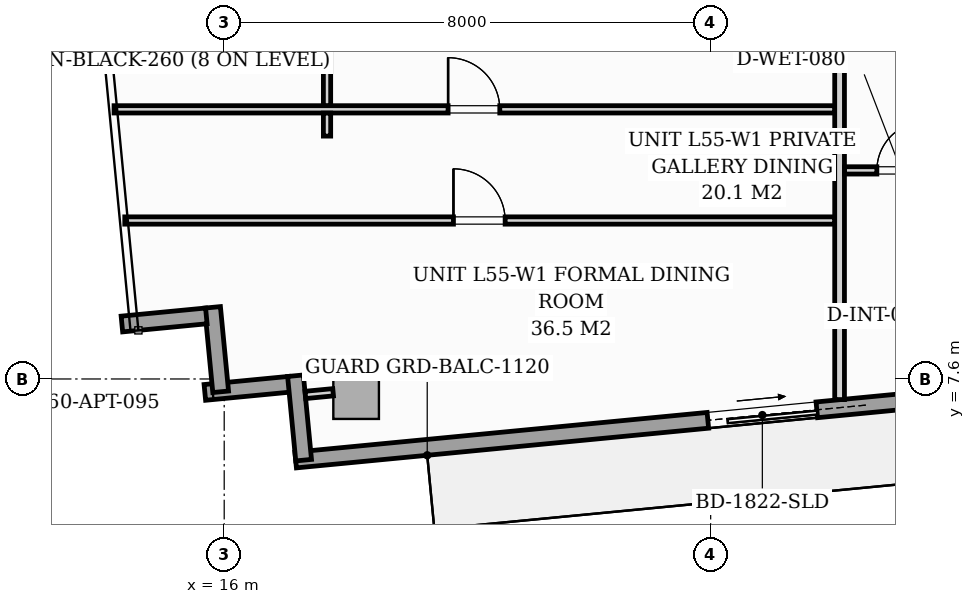
"""IFC4 building model, lengths in metres.
Left out: names, types, materials, properties, quantities, classifications, styles, units other than length and angle.
Written with IfcOpenShell. Run it as: python <this file> out.ifc"""

import sys

from ifc_helpers import new_model, si_unit, direction, frame, frame_2d, origin, origin_2d, place, context, subcontext, project, spatial, rectangle, extrude, source, transform, mapped, element, fill, save


model = new_model("IFC4")
c1 = context("Model", 3, precision=1e-05, world=origin(), true_north=direction((0.0, 1.0)))
c2 = subcontext(c1, "Body", "Model", "MODEL_VIEW")
j1 = project(units=[si_unit("LENGTHUNIT", "METRE"), si_unit("PLANEANGLEUNIT", "RADIAN")], contexts=[c1])
p1 = place(None, origin())
s1 = spatial("IfcSite", under=j1, at=p1, CompositionType="ELEMENT")
p2 = place(p1, origin())
s2 = spatial("IfcBuilding", under=s1, at=p2, CompositionType="ELEMENT")
p3 = place(p2, frame((0.0, 0.0, 192.2)))
s3 = spatial("IfcBuildingStorey", under=s2, at=p3, CompositionType="ELEMENT", Elevation=192.2)
m1 = source(origin(), c2, "Body", "SweptSolid", [
    extrude(rectangle(XDim=0.75, YDim=0.95, at=origin_2d()), origin(), (0.0, 0.0, 1.0), 3.196),
])
p4 = place(p3, frame((18.169, 7.418, 0.002), z_axis=(0.0, 0.0, 1.0), x_axis=(0.995396198367, 0.09584575252, 0.0)))
e1 = element("IfcColumn", 1, at=p4, inside=s3, PredefinedType="COLUMN", context=c2, shape_type="MappedRepresentation", body=[
    mapped(m1, transform((0.0, 0.0, 0.0), scale=1.0)),
])
p5 = place(p3, frame((17.07, 7.513, 0.0), z_axis=(0.0, 0.0, 1.0), x_axis=(-0.995391056452, -0.09589913835, 0.0)))
e2 = element("IfcWall", 2, at=p5, inside=s3, PredefinedType="STANDARD", context=c2, shape_type="SweptSolid", body=[
    extrude(rectangle(XDim=1.395, YDim=0.26, at=frame_2d((0.698, 0.0))), origin(), (0.0, 0.0, 1.0), 2.94),
])
p6 = place(p3, frame((15.942, 7.389, 0.0), z_axis=(0.0, 0.0, 1.0), x_axis=(-0.095742423056, 0.99540614245, 0.0)))
e3 = element("IfcWall", 3, at=p6, inside=s3, PredefinedType="STANDARD", context=c2, shape_type="SweptSolid", body=[
    extrude(rectangle(XDim=1.395, YDim=0.26, at=frame_2d((0.697, 0.0))), origin(), (0.0, 0.0, 1.0), 2.94),
])
p7 = place(p3, frame((15.706, 8.637, 0.0), z_axis=(0.0, 0.0, 1.0), x_axis=(-0.995391056452, -0.09589913835, 0.0)))
e4 = element("IfcWall", 4, at=p7, inside=s3, PredefinedType="STANDARD", context=c2, shape_type="SweptSolid", body=[
    extrude(rectangle(XDim=1.395, YDim=0.26, at=frame_2d((0.698, 0.0))), origin(), (0.0, 0.0, 1.0), 2.94),
])
p8 = place(p3, frame((33.201, 7.81, 0.0), z_axis=(0.0, 0.0, 1.0), x_axis=(-0.995397074604, -0.095836652014, 0.0)))
e5 = element("IfcWall", 5, at=p8, inside=s3, PredefinedType="STANDARD", context=c2, shape_type="SweptSolid", body=[
    extrude(rectangle(XDim=16.1, YDim=0.26, at=frame_2d((8.05, 0.0))), origin(), (0.0, 0.0, 1.0), 2.94),
])
p9 = place(p8, frame((7.49, 0.0, 0.0)))
e6 = element("IfcOpeningElement", 6, at=p9, cuts=e5, PredefinedType="OPENING", context=c2, shape_type="SweptSolid", body=[
    extrude(rectangle(XDim=1.8, YDim=2.06, at=frame_2d((0.9, 1.03))), frame((0.0, 0.14, 0.0), z_axis=(0.0, -1.0, 0.0), x_axis=(1.0, 0.0, 0.0)), (0.0, 0.0, 1.0), 0.28),
])
p10 = place(p8, frame((1.15, 0.0, 0.65)))
e7 = element("IfcOpeningElement", 7, at=p10, cuts=e5, PredefinedType="OPENING", context=c2, shape_type="SweptSolid", body=[
    extrude(rectangle(XDim=1.6, YDim=1.5, at=frame_2d((0.8, 0.75))), frame((0.0, 0.14, 0.0), z_axis=(0.0, -1.0, 0.0), x_axis=(1.0, 0.0, 0.0)), (0.0, 0.0, 1.0), 0.28),
])
p11 = place(p3, frame((17.306, 6.265, 0.0), z_axis=(0.0, 0.0, 1.0), x_axis=(-0.095915846097, 0.995389446633, 0.0)))
e8 = element("IfcWall", 8, at=p11, inside=s3, PredefinedType="STANDARD", context=c2, shape_type="SweptSolid", body=[
    extrude(rectangle(XDim=1.395, YDim=0.26, at=frame_2d((0.697, 0.0))), origin(), (0.0, 0.0, 1.0), 2.94),
])
p12 = place(p3, frame((26.12, 7.261, 0.0), z_axis=(0.0, 0.0, 1.0), x_axis=(0.0, 1.0, 0.0)))
e9 = element("IfcWall", 9, at=p12, inside=s3, PredefinedType="PARTITIONING", context=c2, shape_type="SweptSolid", body=[
    extrude(rectangle(XDim=5.937, YDim=0.16, at=frame_2d((2.968, 0.0))), origin(), (0.0, 0.0, 1.0), 2.94),
])
p13 = place(p3, frame((26.202, 11.03, 0.0), z_axis=(0.0, 0.0, 1.0), x_axis=(1.0, 0.0, 0.0)))
e10 = element("IfcWall", 10, at=p13, inside=s3, PredefinedType="PARTITIONING", context=c2, shape_type="SweptSolid", body=[
    extrude(rectangle(XDim=3.978, YDim=0.12, at=frame_2d((1.989, 0.0))), origin(), (0.0, 0.0, 1.0), 2.94),
])
p14 = place(p13, frame((0.531, 0.0, 0.0)))
e11 = element("IfcOpeningElement", 11, at=p14, cuts=e10, PredefinedType="OPENING", context=c2, shape_type="SweptSolid", body=[
    extrude(rectangle(XDim=0.8, YDim=2.02, at=frame_2d((0.4, 1.01))), frame((0.0, 0.07, 0.0), z_axis=(0.0, -1.0, 0.0), x_axis=(1.0, 0.0, 0.0)), (0.0, 0.0, 1.0), 0.14),
])
p15 = place(p13, frame((2.496, 0.0, 0.0)))
e12 = element("IfcOpeningElement", 12, at=p15, cuts=e10, PredefinedType="OPENING", context=c2, shape_type="SweptSolid", body=[
    extrude(rectangle(XDim=0.85, YDim=2.05, at=frame_2d((0.425, 1.025))), frame((0.0, 0.07, 0.0), z_axis=(0.0, -1.0, 0.0), x_axis=(1.0, 0.0, 0.0)), (0.0, 0.0, 1.0), 0.14),
])
p16 = place(p3, frame((14.365, 10.206, 0.0), z_axis=(0.0, 0.0, 1.0), x_axis=(1.0, 0.0, 0.0)))
e13 = element("IfcWall", 13, at=p16, inside=s3, PredefinedType="PARTITIONING", context=c2, shape_type="SweptSolid", body=[
    extrude(rectangle(XDim=11.673, YDim=0.12, at=frame_2d((5.837, 0.0))), origin(), (0.0, 0.0, 1.0), 2.94),
])
p17 = place(p16, frame((5.405, 0.0, 0.0)))
e14 = element("IfcOpeningElement", 14, at=p17, cuts=e13, PredefinedType="OPENING", context=c2, shape_type="SweptSolid", body=[
    extrude(rectangle(XDim=0.85, YDim=2.05, at=frame_2d((0.425, 1.025))), frame((0.0, 0.07, 0.0), z_axis=(0.0, -1.0, 0.0), x_axis=(1.0, 0.0, 0.0)), (0.0, 0.0, 1.0), 0.14),
])
p18 = place(p3, frame((14.189, 12.034, 0.0), z_axis=(0.0, 0.0, 1.0), x_axis=(1.0, 0.0, 0.0)))
e15 = element("IfcWall", 15, at=p18, inside=s3, PredefinedType="PARTITIONING", context=c2, shape_type="SweptSolid", body=[
    extrude(rectangle(XDim=11.849, YDim=0.12, at=frame_2d((5.925, 0.0))), origin(), (0.0, 0.0, 1.0), 2.94),
])
p19 = place(p18, frame((5.493, 0.0, 0.0)))
e16 = element("IfcOpeningElement", 16, at=p19, cuts=e15, PredefinedType="OPENING", context=c2, shape_type="SweptSolid", body=[
    extrude(rectangle(XDim=0.85, YDim=2.05, at=frame_2d((0.425, 1.025))), frame((0.0, 0.07, 0.0), z_axis=(0.0, -1.0, 0.0), x_axis=(1.0, 0.0, 0.0)), (0.0, 0.0, 1.0), 0.14),
])
p20 = place(p3, frame((17.691, 11.594, 0.0), z_axis=(0.0, 0.0, 1.0), x_axis=(0.0, 1.0, 0.0)))
e17 = element("IfcWall", 17, at=p20, inside=s3, PredefinedType="PARTITIONING", context=c2, shape_type="SweptSolid", body=[
    extrude(rectangle(XDim=0.378, YDim=0.12, at=frame_2d((0.189, 0.0))), origin(), (0.0, 0.0, 1.0), 2.94),
])
p21 = place(p3, frame((17.691, 12.096, 0.0), z_axis=(0.0, 0.0, 1.0), x_axis=(0.0, 1.0, 0.0)))
e18 = element("IfcWall", 18, at=p21, inside=s3, PredefinedType="PARTITIONING", context=c2, shape_type="SweptSolid", body=[
    extrude(rectangle(XDim=8.689, YDim=0.12, at=frame_2d((4.344, 0.0))), origin(), (0.0, 0.0, 1.0), 2.94),
])
p22 = place(p21, frame((3.92, 0.0, 0.0)))
e19 = element("IfcOpeningElement", 19, at=p22, cuts=e18, PredefinedType="OPENING", context=c2, shape_type="SweptSolid", body=[
    extrude(rectangle(XDim=0.85, YDim=2.05, at=frame_2d((0.425, 1.025))), frame((0.0, 0.07, 0.0), z_axis=(0.0, -1.0, 0.0), x_axis=(1.0, 0.0, 0.0)), (0.0, 0.0, 1.0), 0.14),
])
p23 = place(p3, frame((17.791, 7.382, 0.0), z_axis=(0.0, 0.0, 1.0), x_axis=(-0.995384576284, -0.09596637586, 0.0)))
e20 = element("IfcWall", 20, at=p23, inside=s3, PredefinedType="PARTITIONING", context=c2, shape_type="SweptSolid", body=[
    extrude(rectangle(XDim=0.458, YDim=0.12, at=frame_2d((0.229, 0.0))), origin(), (0.0, 0.0, 1.0), 2.94),
])
m2 = source(origin(), c2, "Body", "SweptSolid", [
    extrude(rectangle(XDim=1.8, YDim=2.06, at=frame_2d((0.9, 1.03))), frame((0.0, 0.025, 0.0), z_axis=(0.0, -1.0, 0.0), x_axis=(1.0, 0.0, 0.0)), (0.0, 0.0, 1.0), 0.05),
])
p24 = place(p9, origin())
e21 = element("IfcDoor", 21, at=p24, inside=s3, OperationType="SLIDING_TO_LEFT", PredefinedType="DOOR", context=c2, shape_type="MappedRepresentation", body=[
    mapped(m2, transform((0.0, 0.0, 0.0), scale=1.0)),
])
fill(e6, e21)
m3 = source(origin(), c2, "Body", "SweptSolid", [
    extrude(rectangle(XDim=0.8, YDim=2.02, at=frame_2d((0.4, 1.01))), frame((0.0, 0.025, 0.0), z_axis=(0.0, -1.0, 0.0), x_axis=(1.0, 0.0, 0.0)), (0.0, 0.0, 1.0), 0.05),
])
p25 = place(p14, origin())
e22 = element("IfcDoor", 22, at=p25, inside=s3, OperationType="SINGLE_SWING_RIGHT", PredefinedType="DOOR", context=c2, shape_type="MappedRepresentation", body=[
    mapped(m3, transform((0.0, 0.0, 0.0), scale=1.0)),
])
fill(e11, e22)
m4 = source(origin(), c2, "Body", "SweptSolid", [
    extrude(rectangle(XDim=0.85, YDim=2.05, at=frame_2d((0.425, 1.025))), frame((0.0, 0.025, 0.0), z_axis=(0.0, -1.0, 0.0), x_axis=(1.0, 0.0, 0.0)), (0.0, 0.0, 1.0), 0.05),
])
p26 = place(p17, origin())
e23 = element("IfcDoor", 23, at=p26, inside=s3, OperationType="SINGLE_SWING_LEFT", PredefinedType="DOOR", context=c2, shape_type="MappedRepresentation", body=[
    mapped(m4, transform((0.0, 0.0, 0.0), scale=1.0)),
])
fill(e14, e23)
p27 = place(p19, origin())
e24 = element("IfcDoor", 24, at=p27, inside=s3, OperationType="SINGLE_SWING_LEFT", PredefinedType="DOOR", context=c2, shape_type="MappedRepresentation", body=[
    mapped(m4, transform((0.0, 0.0, 0.0), scale=1.0)),
])
fill(e16, e24)
save(model, sys.argv[1])
